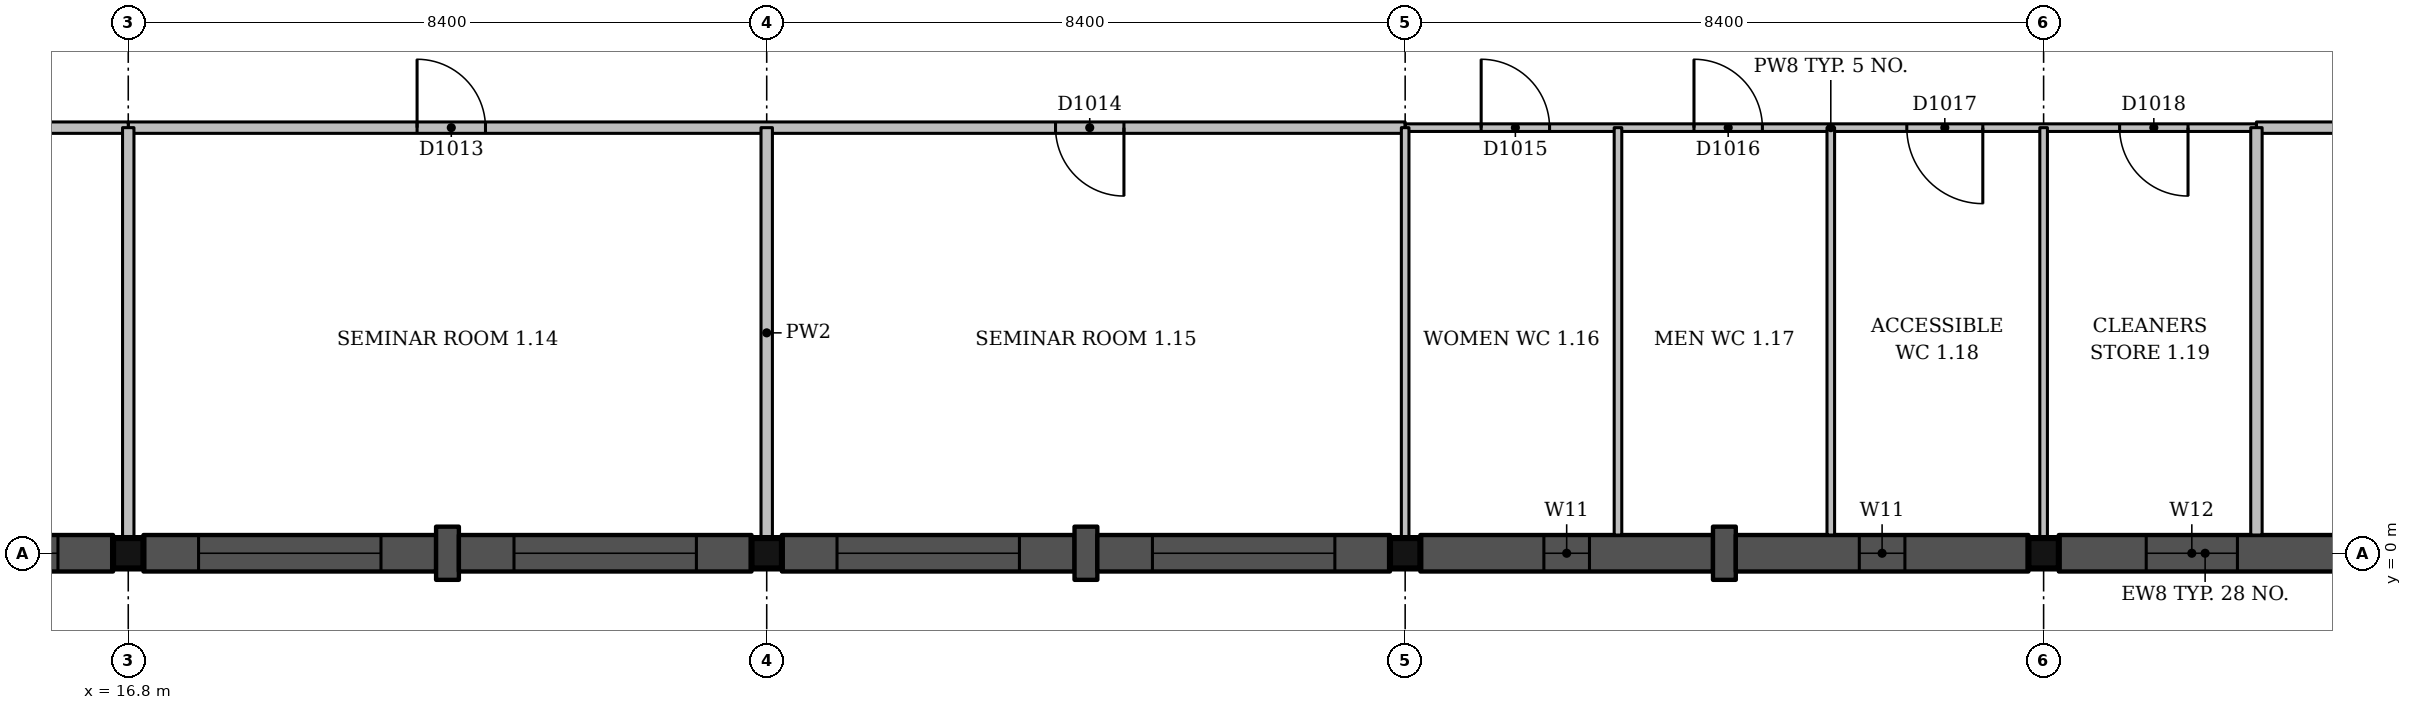
"""IFC4 building model, lengths in metres.
Left out: names, types, materials, properties, quantities, classifications, styles, units other than length and angle.
Written with IfcOpenShell. Run it as: python <this file> out.ifc"""

import sys

from ifc_helpers import new_model, si_unit, direction, frame, frame_2d, origin, origin_2d, place, context, subcontext, project, spatial, rectangle, extrude, element, fill, save


model = new_model("IFC4")
c1 = context("Model", 3, precision=1e-05, world=origin(), true_north=direction((0.0, 1.0)))
c2 = subcontext(c1, "Body", "Model", "MODEL_VIEW")
j1 = project(units=[si_unit("LENGTHUNIT", "METRE"), si_unit("PLANEANGLEUNIT", "RADIAN")], contexts=[c1])
p1 = place(None, origin())
s1 = spatial("IfcSite", under=j1, at=p1, CompositionType="ELEMENT")
p2 = place(p1, origin())
s2 = spatial("IfcBuilding", under=s1, at=p2, CompositionType="ELEMENT")
p3 = place(p2, frame((0.0, 0.0, 4.5)))
s3 = spatial("IfcBuildingStorey", under=s2, at=p3, CompositionType="ELEMENT", Elevation=4.5)
for number, where, z_axis, x_axis in (
    (1, (16.8, 0.0, 0.0), (0.0, 0.0, 1.0), (1.0, 0.0, 0.0)),
    (2, (25.2, 0.0, 0.0), (0.0, 0.0, 1.0), (1.0, 0.0, 0.0)),
    (3, (33.6, 0.0, 0.0), (0.0, 0.0, 1.0), (1.0, 0.0, 0.0)),
    (4, (42.0, 0.0, 0.0), (0.0, 0.0, 1.0), (1.0, 0.0, 0.0)),
):
    element("IfcColumn", number, at=place(p3, frame(where, z_axis=z_axis, x_axis=x_axis)), inside=s3, PredefinedType="COLUMN", context=c2, shape_type="SweptSolid", body=[
        extrude(rectangle(XDim=0.4, YDim=0.4, at=origin_2d()), origin(), (0.0, 0.0, 1.0), 4.5),
    ])
p4 = place(p3, frame((12.75, 0.0, 0.0), z_axis=(0.0, 0.0, 1.0), x_axis=(1.0, 0.0, 0.0)))
e5 = element("IfcWall", 5, at=p4, inside=s3, PredefinedType="SOLIDWALL", context=c2, shape_type="SweptSolid", body=[
    extrude(rectangle(XDim=3.85, YDim=0.48, at=frame_2d((1.925, 0.0))), origin(), (0.0, 0.0, 1.0), 3.45),
])
p5 = place(p4, frame((0.725, 0.0, 2.4)))
e6 = element("IfcOpeningElement", 6, at=p5, cuts=e5, PredefinedType="OPENING", context=c2, shape_type="SweptSolid", body=[
    extrude(rectangle(XDim=2.4, YDim=0.6, at=frame_2d((1.2, 0.3))), frame((0.0, 0.25, 0.0), z_axis=(0.0, -1.0, 0.0), x_axis=(1.0, 0.0, 0.0)), (0.0, 0.0, 1.0), 0.5),
])
p6 = place(p3, frame((17.0, 0.0, 0.0), z_axis=(0.0, 0.0, 1.0), x_axis=(1.0, 0.0, 0.0)))
e7 = element("IfcWall", 7, at=p6, inside=s3, PredefinedType="SOLIDWALL", context=c2, shape_type="SweptSolid", body=[
    extrude(rectangle(XDim=3.85, YDim=0.48, at=frame_2d((1.925, 0.0))), origin(), (0.0, 0.0, 1.0), 3.45),
])
p7 = place(p6, frame((0.725, 0.0, 2.4)))
e8 = element("IfcOpeningElement", 8, at=p7, cuts=e7, PredefinedType="OPENING", context=c2, shape_type="SweptSolid", body=[
    extrude(rectangle(XDim=2.4, YDim=0.6, at=frame_2d((1.2, 0.3))), frame((0.0, 0.25, 0.0), z_axis=(0.0, -1.0, 0.0), x_axis=(1.0, 0.0, 0.0)), (0.0, 0.0, 1.0), 0.5),
])
p8 = place(p3, frame((20.85, 0.0, 0.0), z_axis=(0.0, 0.0, 1.0), x_axis=(1.0, 0.0, 0.0)))
e9 = element("IfcWall", 9, at=p8, inside=s3, PredefinedType="SOLIDWALL", context=c2, shape_type="SweptSolid", body=[
    extrude(rectangle(XDim=0.3, YDim=0.7, at=frame_2d((0.15, 0.0))), origin(), (0.0, 0.0, 1.0), 3.45),
])
p9 = place(p3, frame((21.15, 0.0, 0.0), z_axis=(0.0, 0.0, 1.0), x_axis=(1.0, 0.0, 0.0)))
e10 = element("IfcWall", 10, at=p9, inside=s3, PredefinedType="SOLIDWALL", context=c2, shape_type="SweptSolid", body=[
    extrude(rectangle(XDim=3.85, YDim=0.48, at=frame_2d((1.925, 0.0))), origin(), (0.0, 0.0, 1.0), 3.45),
])
p10 = place(p9, frame((0.725, 0.0, 2.4)))
e11 = element("IfcOpeningElement", 11, at=p10, cuts=e10, PredefinedType="OPENING", context=c2, shape_type="SweptSolid", body=[
    extrude(rectangle(XDim=2.4, YDim=0.6, at=frame_2d((1.2, 0.3))), frame((0.0, 0.25, 0.0), z_axis=(0.0, -1.0, 0.0), x_axis=(1.0, 0.0, 0.0)), (0.0, 0.0, 1.0), 0.5),
])
p11 = place(p3, frame((25.4, 0.0, 0.0), z_axis=(0.0, 0.0, 1.0), x_axis=(1.0, 0.0, 0.0)))
e12 = element("IfcWall", 12, at=p11, inside=s3, PredefinedType="SOLIDWALL", context=c2, shape_type="SweptSolid", body=[
    extrude(rectangle(XDim=3.85, YDim=0.48, at=frame_2d((1.925, 0.0))), origin(), (0.0, 0.0, 1.0), 3.45),
])
p12 = place(p11, frame((0.725, 0.0, 2.4)))
e13 = element("IfcOpeningElement", 13, at=p12, cuts=e12, PredefinedType="OPENING", context=c2, shape_type="SweptSolid", body=[
    extrude(rectangle(XDim=2.4, YDim=0.6, at=frame_2d((1.2, 0.3))), frame((0.0, 0.25, 0.0), z_axis=(0.0, -1.0, 0.0), x_axis=(1.0, 0.0, 0.0)), (0.0, 0.0, 1.0), 0.5),
])
p13 = place(p3, frame((29.25, 0.0, 0.0), z_axis=(0.0, 0.0, 1.0), x_axis=(1.0, 0.0, 0.0)))
e14 = element("IfcWall", 14, at=p13, inside=s3, PredefinedType="SOLIDWALL", context=c2, shape_type="SweptSolid", body=[
    extrude(rectangle(XDim=0.3, YDim=0.7, at=frame_2d((0.15, 0.0))), origin(), (0.0, 0.0, 1.0), 3.45),
])
p14 = place(p3, frame((29.55, 0.0, 0.0), z_axis=(0.0, 0.0, 1.0), x_axis=(1.0, 0.0, 0.0)))
e15 = element("IfcWall", 15, at=p14, inside=s3, PredefinedType="SOLIDWALL", context=c2, shape_type="SweptSolid", body=[
    extrude(rectangle(XDim=3.85, YDim=0.48, at=frame_2d((1.925, 0.0))), origin(), (0.0, 0.0, 1.0), 3.45),
])
p15 = place(p14, frame((0.725, 0.0, 2.4)))
e16 = element("IfcOpeningElement", 16, at=p15, cuts=e15, PredefinedType="OPENING", context=c2, shape_type="SweptSolid", body=[
    extrude(rectangle(XDim=2.4, YDim=0.6, at=frame_2d((1.2, 0.3))), frame((0.0, 0.25, 0.0), z_axis=(0.0, -1.0, 0.0), x_axis=(1.0, 0.0, 0.0)), (0.0, 0.0, 1.0), 0.5),
])
p16 = place(p3, frame((33.8, 0.0, 0.0), z_axis=(0.0, 0.0, 1.0), x_axis=(1.0, 0.0, 0.0)))
e17 = element("IfcWall", 17, at=p16, inside=s3, PredefinedType="SOLIDWALL", context=c2, shape_type="SweptSolid", body=[
    extrude(rectangle(XDim=3.85, YDim=0.48, at=frame_2d((1.925, 0.0))), origin(), (0.0, 0.0, 1.0), 3.45),
])
p17 = place(p16, frame((1.625, 0.0, 1.5)))
e18 = element("IfcOpeningElement", 18, at=p17, cuts=e17, PredefinedType="OPENING", context=c2, shape_type="SweptSolid", body=[
    extrude(rectangle(XDim=0.6, YDim=1.2, at=frame_2d((0.3, 0.6))), frame((0.0, 0.25, 0.0), z_axis=(0.0, -1.0, 0.0), x_axis=(1.0, 0.0, 0.0)), (0.0, 0.0, 1.0), 0.5),
])
p18 = place(p3, frame((37.65, 0.0, 0.0), z_axis=(0.0, 0.0, 1.0), x_axis=(1.0, 0.0, 0.0)))
e19 = element("IfcWall", 19, at=p18, inside=s3, PredefinedType="SOLIDWALL", context=c2, shape_type="SweptSolid", body=[
    extrude(rectangle(XDim=0.3, YDim=0.7, at=frame_2d((0.15, 0.0))), origin(), (0.0, 0.0, 1.0), 3.45),
])
p19 = place(p3, frame((37.95, 0.0, 0.0), z_axis=(0.0, 0.0, 1.0), x_axis=(1.0, 0.0, 0.0)))
e20 = element("IfcWall", 20, at=p19, inside=s3, PredefinedType="SOLIDWALL", context=c2, shape_type="SweptSolid", body=[
    extrude(rectangle(XDim=3.85, YDim=0.48, at=frame_2d((1.925, 0.0))), origin(), (0.0, 0.0, 1.0), 3.45),
])
p20 = place(p19, frame((1.625, 0.0, 1.5)))
e21 = element("IfcOpeningElement", 21, at=p20, cuts=e20, PredefinedType="OPENING", context=c2, shape_type="SweptSolid", body=[
    extrude(rectangle(XDim=0.6, YDim=1.2, at=frame_2d((0.3, 0.6))), frame((0.0, 0.25, 0.0), z_axis=(0.0, -1.0, 0.0), x_axis=(1.0, 0.0, 0.0)), (0.0, 0.0, 1.0), 0.5),
])
p21 = place(p3, frame((42.2, 0.0, 0.0), z_axis=(0.0, 0.0, 1.0), x_axis=(1.0, 0.0, 0.0)))
e22 = element("IfcWall", 22, at=p21, inside=s3, PredefinedType="SOLIDWALL", context=c2, shape_type="SweptSolid", body=[
    extrude(rectangle(XDim=3.85, YDim=0.48, at=frame_2d((1.925, 0.0))), origin(), (0.0, 0.0, 1.0), 3.45),
])
p22 = place(p21, frame((1.15, 0.0, 2.4)))
e23 = element("IfcOpeningElement", 23, at=p22, cuts=e22, PredefinedType="OPENING", context=c2, shape_type="SweptSolid", body=[
    extrude(rectangle(XDim=1.2, YDim=0.6, at=frame_2d((0.6, 0.3))), frame((0.0, 0.25, 0.0), z_axis=(0.0, -1.0, 0.0), x_axis=(1.0, 0.0, 0.0)), (0.0, 0.0, 1.0), 0.5),
])
p23 = place(p3, frame((16.8, 5.6, 0.0), z_axis=(0.0, 0.0, 1.0), x_axis=(1.0, 0.0, 0.0)))
e24 = element("IfcWall", 24, at=p23, inside=s3, PredefinedType="PARTITIONING", context=c2, shape_type="SweptSolid", body=[
    extrude(rectangle(XDim=16.8, YDim=0.15, at=frame_2d((8.4, 0.0))), origin(), (0.0, 0.0, 1.0), 3.5),
])
p24 = place(p23, frame((3.8, 0.0, 0.0)))
e25 = element("IfcOpeningElement", 25, at=p24, cuts=e24, PredefinedType="OPENING", context=c2, shape_type="SweptSolid", body=[
    extrude(rectangle(XDim=0.9, YDim=2.1, at=frame_2d((0.45, 1.05))), frame((0.0, 0.085, 0.0), z_axis=(0.0, -1.0, 0.0), x_axis=(1.0, 0.0, 0.0)), (0.0, 0.0, 1.0), 0.17),
])
p25 = place(p23, frame((12.2, 0.0, 0.0)))
e26 = element("IfcOpeningElement", 26, at=p25, cuts=e24, PredefinedType="OPENING", context=c2, shape_type="SweptSolid", body=[
    extrude(rectangle(XDim=0.9, YDim=2.1, at=frame_2d((0.45, 1.05))), frame((0.0, 0.085, 0.0), z_axis=(0.0, -1.0, 0.0), x_axis=(1.0, 0.0, 0.0)), (0.0, 0.0, 1.0), 0.17),
])
p26 = place(p3, frame((0.24, 5.6, 0.0), z_axis=(0.0, 0.0, 1.0), x_axis=(1.0, 0.0, 0.0)))
e27 = element("IfcWall", 27, at=p26, inside=s3, PredefinedType="PARTITIONING", context=c2, shape_type="SweptSolid", body=[
    extrude(rectangle(XDim=16.56, YDim=0.15, at=frame_2d((8.28, 0.0))), origin(), (0.0, 0.0, 1.0), 3.5),
])
p27 = place(p26, frame((7.65, 0.0, 0.0)))
e28 = element("IfcOpeningElement", 28, at=p27, cuts=e27, PredefinedType="OPENING", context=c2, shape_type="SweptSolid", body=[
    extrude(rectangle(XDim=1.0, YDim=2.1, at=frame_2d((0.5, 1.05))), frame((0.0, 0.085, 0.0), z_axis=(0.0, -1.0, 0.0), x_axis=(1.0, 0.0, 0.0)), (0.0, 0.0, 1.0), 0.17),
])
p28 = place(p3, frame((44.8, 5.6, 0.0), z_axis=(0.0, 0.0, 1.0), x_axis=(1.0, 0.0, 0.0)))
e29 = element("IfcWall", 29, at=p28, inside=s3, PredefinedType="PARTITIONING", context=c2, shape_type="SweptSolid", body=[
    extrude(rectangle(XDim=16.8, YDim=0.15, at=frame_2d((8.4, 0.0))), origin(), (0.0, 0.0, 1.0), 3.5),
])
p29 = place(p28, frame((8.0, 0.0, 0.0)))
e30 = element("IfcOpeningElement", 30, at=p29, cuts=e29, PredefinedType="OPENING", context=c2, shape_type="SweptSolid", body=[
    extrude(rectangle(XDim=1.0, YDim=2.1, at=frame_2d((0.5, 1.05))), frame((0.0, 0.085, 0.0), z_axis=(0.0, -1.0, 0.0), x_axis=(1.0, 0.0, 0.0)), (0.0, 0.0, 1.0), 0.17),
])
p30 = place(p3, frame((33.6, 5.6, 0.0), z_axis=(0.0, 0.0, 1.0), x_axis=(1.0, 0.0, 0.0)))
e31 = element("IfcWall", 31, at=p30, inside=s3, PredefinedType="PARTITIONING", context=c2, shape_type="SweptSolid", body=[
    extrude(rectangle(XDim=11.2, YDim=0.1, at=frame_2d((5.6, 0.0))), origin(), (0.0, 0.0, 1.0), 3.5),
])
p31 = place(p30, frame((1.0, 0.0, 0.0)))
e32 = element("IfcOpeningElement", 32, at=p31, cuts=e31, PredefinedType="OPENING", context=c2, shape_type="SweptSolid", body=[
    extrude(rectangle(XDim=0.9, YDim=2.1, at=frame_2d((0.45, 1.05))), frame((0.0, 0.06, 0.0), z_axis=(0.0, -1.0, 0.0), x_axis=(1.0, 0.0, 0.0)), (0.0, 0.0, 1.0), 0.12),
])
p32 = place(p30, frame((3.8, 0.0, 0.0)))
e33 = element("IfcOpeningElement", 33, at=p32, cuts=e31, PredefinedType="OPENING", context=c2, shape_type="SweptSolid", body=[
    extrude(rectangle(XDim=0.9, YDim=2.1, at=frame_2d((0.45, 1.05))), frame((0.0, 0.06, 0.0), z_axis=(0.0, -1.0, 0.0), x_axis=(1.0, 0.0, 0.0)), (0.0, 0.0, 1.0), 0.12),
])
p33 = place(p30, frame((6.6, 0.0, 0.0)))
e34 = element("IfcOpeningElement", 34, at=p33, cuts=e31, PredefinedType="OPENING", context=c2, shape_type="SweptSolid", body=[
    extrude(rectangle(XDim=1.0, YDim=2.1, at=frame_2d((0.5, 1.05))), frame((0.0, 0.06, 0.0), z_axis=(0.0, -1.0, 0.0), x_axis=(1.0, 0.0, 0.0)), (0.0, 0.0, 1.0), 0.12),
])
p34 = place(p30, frame((9.4, 0.0, 0.0)))
e35 = element("IfcOpeningElement", 35, at=p34, cuts=e31, PredefinedType="OPENING", context=c2, shape_type="SweptSolid", body=[
    extrude(rectangle(XDim=0.9, YDim=2.1, at=frame_2d((0.45, 1.05))), frame((0.0, 0.06, 0.0), z_axis=(0.0, -1.0, 0.0), x_axis=(1.0, 0.0, 0.0)), (0.0, 0.0, 1.0), 0.12),
])
for number, where, z_axis, x_axis in (
    (36, (16.8, 0.2, 0.0), (0.0, 0.0, 1.0), (0.0, 1.0, 0.0)),
    (37, (25.2, 0.2, 0.0), (0.0, 0.0, 1.0), (0.0, 1.0, 0.0)),
):
    element("IfcWall", number, at=place(p3, frame(where, z_axis=z_axis, x_axis=x_axis)), inside=s3, PredefinedType="PARTITIONING", context=c2, shape_type="SweptSolid", body=[
        extrude(rectangle(XDim=5.4, YDim=0.15, at=frame_2d((2.7, 0.0))), origin(), (0.0, 0.0, 1.0), 3.5),
    ])
p35 = place(p3, frame((33.6, 0.2, 0.0), z_axis=(0.0, 0.0, 1.0), x_axis=(0.0, 1.0, 0.0)))
e38 = element("IfcWall", 38, at=p35, inside=s3, PredefinedType="PARTITIONING", context=c2, shape_type="SweptSolid", body=[
    extrude(rectangle(XDim=5.4, YDim=0.1, at=frame_2d((2.7, 0.0))), origin(), (0.0, 0.0, 1.0), 3.5),
])
for number, where, z_axis, x_axis in (
    (39, (36.4, 0.24, 0.0), (0.0, 0.0, 1.0), (0.0, 1.0, 0.0)),
    (40, (39.2, 0.24, 0.0), (0.0, 0.0, 1.0), (0.0, 1.0, 0.0)),
):
    element("IfcWall", number, at=place(p3, frame(where, z_axis=z_axis, x_axis=x_axis)), inside=s3, PredefinedType="PARTITIONING", context=c2, shape_type="SweptSolid", body=[
        extrude(rectangle(XDim=5.36, YDim=0.1, at=frame_2d((2.68, 0.0))), origin(), (0.0, 0.0, 1.0), 4.15),
    ])
p36 = place(p3, frame((42.0, 0.2, 0.0), z_axis=(0.0, 0.0, 1.0), x_axis=(0.0, 1.0, 0.0)))
e41 = element("IfcWall", 41, at=p36, inside=s3, PredefinedType="PARTITIONING", context=c2, shape_type="SweptSolid", body=[
    extrude(rectangle(XDim=5.4, YDim=0.1, at=frame_2d((2.7, 0.0))), origin(), (0.0, 0.0, 1.0), 3.5),
])
p37 = place(p3, frame((44.8, 0.24, 0.0), z_axis=(0.0, 0.0, 1.0), x_axis=(0.0, 1.0, 0.0)))
e42 = element("IfcWall", 42, at=p37, inside=s3, PredefinedType="PARTITIONING", context=c2, shape_type="SweptSolid", body=[
    extrude(rectangle(XDim=5.36, YDim=0.15, at=frame_2d((2.68, 0.0))), origin(), (0.0, 0.0, 1.0), 4.15),
])
p38 = place(p5, origin())
e43 = element("IfcWindow", 43, at=p38, inside=s3, PartitioningType="SINGLE_PANEL", PredefinedType="WINDOW", context=c2, shape_type="SweptSolid", body=[
    extrude(rectangle(XDim=2.4, YDim=0.6, at=frame_2d((1.2, 0.3))), frame((0.0, 0.12, 0.0), z_axis=(0.0, -1.0, 0.0), x_axis=(1.0, 0.0, 0.0)), (0.0, 0.0, 1.0), 0.06),
])
fill(e6, e43)
p39 = place(p7, origin())
e44 = element("IfcWindow", 44, at=p39, inside=s3, PartitioningType="SINGLE_PANEL", PredefinedType="WINDOW", context=c2, shape_type="SweptSolid", body=[
    extrude(rectangle(XDim=2.4, YDim=0.6, at=frame_2d((1.2, 0.3))), frame((0.0, 0.12, 0.0), z_axis=(0.0, -1.0, 0.0), x_axis=(1.0, 0.0, 0.0)), (0.0, 0.0, 1.0), 0.06),
])
fill(e8, e44)
p40 = place(p10, origin())
e45 = element("IfcWindow", 45, at=p40, inside=s3, PartitioningType="SINGLE_PANEL", PredefinedType="WINDOW", context=c2, shape_type="SweptSolid", body=[
    extrude(rectangle(XDim=2.4, YDim=0.6, at=frame_2d((1.2, 0.3))), frame((0.0, 0.12, 0.0), z_axis=(0.0, -1.0, 0.0), x_axis=(1.0, 0.0, 0.0)), (0.0, 0.0, 1.0), 0.06),
])
fill(e11, e45)
p41 = place(p12, origin())
e46 = element("IfcWindow", 46, at=p41, inside=s3, PartitioningType="SINGLE_PANEL", PredefinedType="WINDOW", context=c2, shape_type="SweptSolid", body=[
    extrude(rectangle(XDim=2.4, YDim=0.6, at=frame_2d((1.2, 0.3))), frame((0.0, 0.12, 0.0), z_axis=(0.0, -1.0, 0.0), x_axis=(1.0, 0.0, 0.0)), (0.0, 0.0, 1.0), 0.06),
])
fill(e13, e46)
p42 = place(p15, origin())
e47 = element("IfcWindow", 47, at=p42, inside=s3, PartitioningType="SINGLE_PANEL", PredefinedType="WINDOW", context=c2, shape_type="SweptSolid", body=[
    extrude(rectangle(XDim=2.4, YDim=0.6, at=frame_2d((1.2, 0.3))), frame((0.0, 0.12, 0.0), z_axis=(0.0, -1.0, 0.0), x_axis=(1.0, 0.0, 0.0)), (0.0, 0.0, 1.0), 0.06),
])
fill(e16, e47)
p43 = place(p17, origin())
e48 = element("IfcWindow", 48, at=p43, inside=s3, PartitioningType="SINGLE_PANEL", PredefinedType="WINDOW", context=c2, shape_type="SweptSolid", body=[
    extrude(rectangle(XDim=0.6, YDim=1.2, at=frame_2d((0.3, 0.6))), frame((0.0, 0.12, 0.0), z_axis=(0.0, -1.0, 0.0), x_axis=(1.0, 0.0, 0.0)), (0.0, 0.0, 1.0), 0.06),
])
fill(e18, e48)
p44 = place(p20, origin())
e49 = element("IfcWindow", 49, at=p44, inside=s3, PartitioningType="SINGLE_PANEL", PredefinedType="WINDOW", context=c2, shape_type="SweptSolid", body=[
    extrude(rectangle(XDim=0.6, YDim=1.2, at=frame_2d((0.3, 0.6))), frame((0.0, 0.12, 0.0), z_axis=(0.0, -1.0, 0.0), x_axis=(1.0, 0.0, 0.0)), (0.0, 0.0, 1.0), 0.06),
])
fill(e21, e49)
p45 = place(p22, origin())
e50 = element("IfcWindow", 50, at=p45, inside=s3, PartitioningType="SINGLE_PANEL", PredefinedType="WINDOW", context=c2, shape_type="SweptSolid", body=[
    extrude(rectangle(XDim=1.2, YDim=0.6, at=frame_2d((0.6, 0.3))), frame((0.0, 0.12, 0.0), z_axis=(0.0, -1.0, 0.0), x_axis=(1.0, 0.0, 0.0)), (0.0, 0.0, 1.0), 0.06),
])
fill(e23, e50)
p46 = place(p24, origin())
e51 = element("IfcDoor", 51, at=p46, inside=s3, OperationType="SINGLE_SWING_LEFT", PredefinedType="DOOR", context=c2, shape_type="SweptSolid", body=[
    extrude(rectangle(XDim=0.9, YDim=2.1, at=frame_2d((0.45, 1.05))), frame((0.0, 0.025, 0.0), z_axis=(0.0, -1.0, 0.0), x_axis=(1.0, 0.0, 0.0)), (0.0, 0.0, 1.0), 0.05),
])
fill(e25, e51)
p47 = place(p25, origin())
e52 = element("IfcDoor", 52, at=p47, inside=s3, OperationType="SINGLE_SWING_RIGHT", PredefinedType="DOOR", context=c2, shape_type="SweptSolid", body=[
    extrude(rectangle(XDim=0.9, YDim=2.1, at=frame_2d((0.45, 1.05))), frame((0.0, 0.025, 0.0), z_axis=(0.0, -1.0, 0.0), x_axis=(1.0, 0.0, 0.0)), (0.0, 0.0, 1.0), 0.05),
])
fill(e26, e52)
p48 = place(p31, origin())
e53 = element("IfcDoor", 53, at=p48, inside=s3, OperationType="SINGLE_SWING_LEFT", PredefinedType="DOOR", context=c2, shape_type="SweptSolid", body=[
    extrude(rectangle(XDim=0.9, YDim=2.1, at=frame_2d((0.45, 1.05))), frame((0.0, 0.025, 0.0), z_axis=(0.0, -1.0, 0.0), x_axis=(1.0, 0.0, 0.0)), (0.0, 0.0, 1.0), 0.05),
])
fill(e32, e53)
p49 = place(p32, origin())
e54 = element("IfcDoor", 54, at=p49, inside=s3, OperationType="SINGLE_SWING_LEFT", PredefinedType="DOOR", context=c2, shape_type="SweptSolid", body=[
    extrude(rectangle(XDim=0.9, YDim=2.1, at=frame_2d((0.45, 1.05))), frame((0.0, 0.025, 0.0), z_axis=(0.0, -1.0, 0.0), x_axis=(1.0, 0.0, 0.0)), (0.0, 0.0, 1.0), 0.05),
])
fill(e33, e54)
p50 = place(p33, origin())
e55 = element("IfcDoor", 55, at=p50, inside=s3, OperationType="SINGLE_SWING_RIGHT", PredefinedType="DOOR", context=c2, shape_type="SweptSolid", body=[
    extrude(rectangle(XDim=1.0, YDim=2.1, at=frame_2d((0.5, 1.05))), frame((0.0, 0.025, 0.0), z_axis=(0.0, -1.0, 0.0), x_axis=(1.0, 0.0, 0.0)), (0.0, 0.0, 1.0), 0.05),
])
fill(e34, e55)
p51 = place(p34, origin())
e56 = element("IfcDoor", 56, at=p51, inside=s3, OperationType="SINGLE_SWING_RIGHT", PredefinedType="DOOR", context=c2, shape_type="SweptSolid", body=[
    extrude(rectangle(XDim=0.9, YDim=2.1, at=frame_2d((0.45, 1.05))), frame((0.0, 0.025, 0.0), z_axis=(0.0, -1.0, 0.0), x_axis=(1.0, 0.0, 0.0)), (0.0, 0.0, 1.0), 0.05),
])
fill(e35, e56)
save(model, sys.argv[1])
